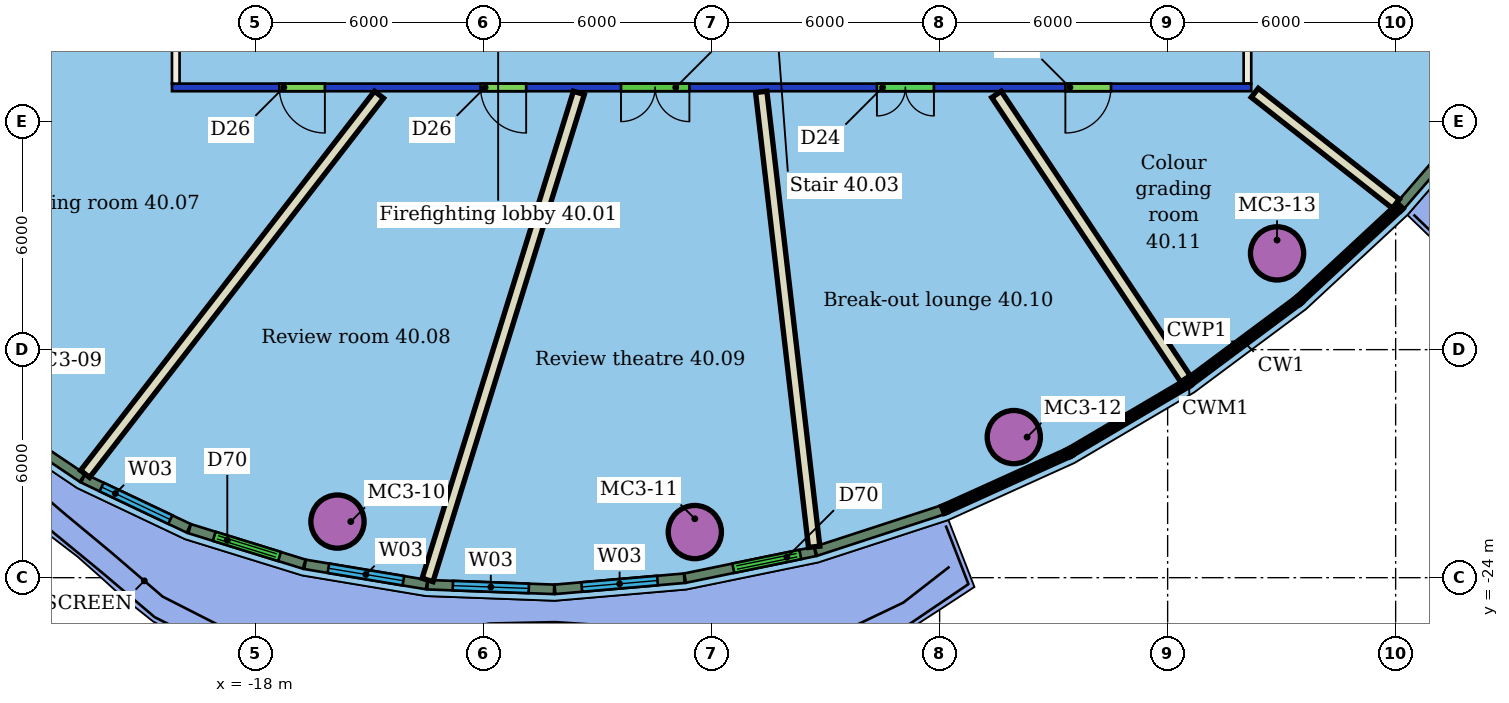
"""IFC4 building model, lengths in metres.
Left out: names, types, materials, properties, quantities, classifications, styles, units other than length and angle.
Written with IfcOpenShell. Run it as: python <this file> out.ifc"""

import sys

from ifc_helpers import new_model, si_unit, direction, frame, frame_2d, origin, origin_2d, place, context, subcontext, project, spatial, rectangle, hollow_circle, extrude, element, fill, save


model = new_model("IFC4")
c1 = context("Model", 3, precision=1e-05, world=origin(), true_north=direction((0.0, 1.0)))
c2 = subcontext(c1, "Body", "Model", "MODEL_VIEW")
j1 = project(units=[si_unit("LENGTHUNIT", "METRE"), si_unit("PLANEANGLEUNIT", "RADIAN")], contexts=[c1])
p1 = place(None, origin())
s1 = spatial("IfcSite", under=j1, at=p1, CompositionType="ELEMENT")
p2 = place(p1, origin())
s2 = spatial("IfcBuilding", under=s1, at=p2, CompositionType="ELEMENT")
p3 = place(p2, frame((0.0, 0.0, 168.6)))
s3 = spatial("IfcBuildingStorey", under=s2, at=p3, CompositionType="ELEMENT", Elevation=168.6)
for number, where, z_axis, x_axis in (
    (1, (-15.845, -22.524, 0.0), (0.0, 0.0, 1.0), (1.0, 0.0, 0.0)),
    (2, (-6.442, -22.8, 0.0), (0.0, 0.0, 1.0), (1.0, 0.0, 0.0)),
    (3, (1.952, -20.301, 0.0), (0.0, 0.0, 1.0), (1.0, 0.0, 0.0)),
    (4, (8.879, -15.467, 0.0), (0.0, 0.0, 1.0), (1.0, 0.0, 0.0)),
):
    element("IfcColumn", number, at=place(p3, frame(where, z_axis=z_axis, x_axis=x_axis)), inside=s3, PredefinedType="COLUMN", context=c2, shape_type="SweptSolid", body=[
        extrude(hollow_circle(Radius=0.7, WallThickness=0.05, at=origin_2d()), origin(), (0.0, 0.0, 1.0), 3.45),
    ])
p4 = place(p3, frame((8.2, -11.1, 0.0), z_axis=(0.0, 0.0, 1.0), x_axis=(-1.0, 0.0, 0.0)))
e5 = element("IfcWall", 5, at=p4, inside=s3, PredefinedType="PARTITIONING", context=c2, shape_type="SweptSolid", body=[
    extrude(rectangle(XDim=28.4, YDim=0.2, at=frame_2d((14.2, 0.0))), origin(), (0.0, 0.0, 1.0), 3.05),
])
p5 = place(p4, frame((24.377, 0.0, 0.0)))
e6 = element("IfcOpeningElement", 6, at=p5, cuts=e5, PredefinedType="OPENING", context=c2, shape_type="SweptSolid", body=[
    extrude(rectangle(XDim=1.2, YDim=2.1, at=frame_2d((0.6, 1.05))), frame((0.0, 0.11, 0.0), z_axis=(0.0, -1.0, 0.0), x_axis=(1.0, 0.0, 0.0)), (0.0, 0.0, 1.0), 0.22),
])
p6 = place(p4, frame((19.08, 0.0, 0.0)))
e7 = element("IfcOpeningElement", 7, at=p6, cuts=e5, PredefinedType="OPENING", context=c2, shape_type="SweptSolid", body=[
    extrude(rectangle(XDim=1.2, YDim=2.1, at=frame_2d((0.6, 1.05))), frame((0.0, 0.11, 0.0), z_axis=(0.0, -1.0, 0.0), x_axis=(1.0, 0.0, 0.0)), (0.0, 0.0, 1.0), 0.22),
])
p7 = place(p4, frame((14.784, 0.0, 0.0)))
e8 = element("IfcOpeningElement", 8, at=p7, cuts=e5, PredefinedType="OPENING", context=c2, shape_type="SweptSolid", body=[
    extrude(rectangle(XDim=1.8, YDim=2.4, at=frame_2d((0.9, 1.2))), frame((0.0, 0.11, 0.0), z_axis=(0.0, -1.0, 0.0), x_axis=(1.0, 0.0, 0.0)), (0.0, 0.0, 1.0), 0.22),
])
p8 = place(p4, frame((8.35, 0.0, 0.0)))
e9 = element("IfcOpeningElement", 9, at=p8, cuts=e5, PredefinedType="OPENING", context=c2, shape_type="SweptSolid", body=[
    extrude(rectangle(XDim=1.5, YDim=2.1, at=frame_2d((0.75, 1.05))), frame((0.0, 0.11, 0.0), z_axis=(0.0, -1.0, 0.0), x_axis=(1.0, 0.0, 0.0)), (0.0, 0.0, 1.0), 0.22),
])
p9 = place(p4, frame((3.691, 0.0, 0.0)))
e10 = element("IfcOpeningElement", 10, at=p9, cuts=e5, PredefinedType="OPENING", context=c2, shape_type="SweptSolid", body=[
    extrude(rectangle(XDim=1.2, YDim=2.1, at=frame_2d((0.6, 1.05))), frame((0.0, 0.11, 0.0), z_axis=(0.0, -1.0, 0.0), x_axis=(1.0, 0.0, 0.0)), (0.0, 0.0, 1.0), 0.22),
])
p10 = place(p3, frame((-20.1, -11.0, 0.0), z_axis=(0.0, 0.0, 1.0), x_axis=(0.0, 1.0, 0.0)))
e11 = element("IfcWall", 11, at=p10, inside=s3, PredefinedType="PARTITIONING", context=c2, shape_type="SweptSolid", body=[
    extrude(rectangle(XDim=22.0, YDim=0.2, at=frame_2d((11.0, 0.0))), origin(), (0.0, 0.0, 1.0), 3.45),
])
p11 = place(p10, frame((16.562, 0.0, 0.0)))
e12 = element("IfcOpeningElement", 12, at=p11, cuts=e11, PredefinedType="OPENING", context=c2, shape_type="SweptSolid", body=[
    extrude(rectangle(XDim=1.0, YDim=2.1, at=frame_2d((0.5, 1.05))), frame((0.0, 0.11, 0.0), z_axis=(0.0, -1.0, 0.0), x_axis=(1.0, 0.0, 0.0)), (0.0, 0.0, 1.0), 0.22),
])
p12 = place(p10, frame((11.71, 0.0, 0.0)))
e13 = element("IfcOpeningElement", 13, at=p12, cuts=e11, PredefinedType="OPENING", context=c2, shape_type="SweptSolid", body=[
    extrude(rectangle(XDim=1.1, YDim=2.1, at=frame_2d((0.55, 1.05))), frame((0.0, 0.11, 0.0), z_axis=(0.0, -1.0, 0.0), x_axis=(1.0, 0.0, 0.0)), (0.0, 0.0, 1.0), 0.22),
])
p13 = place(p10, frame((6.269, 0.0, 0.0)))
e14 = element("IfcOpeningElement", 14, at=p13, cuts=e11, PredefinedType="OPENING", context=c2, shape_type="SweptSolid", body=[
    extrude(rectangle(XDim=1.2, YDim=2.1, at=frame_2d((0.6, 1.05))), frame((0.0, 0.11, 0.0), z_axis=(0.0, -1.0, 0.0), x_axis=(1.0, 0.0, 0.0)), (0.0, 0.0, 1.0), 0.22),
])
p14 = place(p3, frame((8.1, 11.0, 0.0), z_axis=(0.0, 0.0, 1.0), x_axis=(0.0, -1.0, 0.0)))
e15 = element("IfcWall", 15, at=p14, inside=s3, PredefinedType="PARTITIONING", context=c2, shape_type="SweptSolid", body=[
    extrude(rectangle(XDim=22.0, YDim=0.2, at=frame_2d((11.0, 0.0))), origin(), (0.0, 0.0, 1.0), 3.45),
])
p15 = place(p14, frame((12.716, 0.0, 0.0)))
e16 = element("IfcOpeningElement", 16, at=p15, cuts=e15, PredefinedType="OPENING", context=c2, shape_type="SweptSolid", body=[
    extrude(rectangle(XDim=1.2, YDim=2.1, at=frame_2d((0.6, 1.05))), frame((0.0, 0.11, 0.0), z_axis=(0.0, -1.0, 0.0), x_axis=(1.0, 0.0, 0.0)), (0.0, 0.0, 1.0), 0.22),
])
p16 = place(p14, frame((5.725, 0.0, 0.0)))
e17 = element("IfcOpeningElement", 17, at=p16, cuts=e15, PredefinedType="OPENING", context=c2, shape_type="SweptSolid", body=[
    extrude(rectangle(XDim=1.1, YDim=2.1, at=frame_2d((0.55, 1.05))), frame((0.0, 0.11, 0.0), z_axis=(0.0, -1.0, 0.0), x_axis=(1.0, 0.0, 0.0)), (0.0, 0.0, 1.0), 0.22),
])
p17 = place(p3, frame((-30.406, -12.699, 0.0), z_axis=(0.0, 0.0, 1.0), x_axis=(0.887102031539, 0.461573380557, 0.0)))
e18 = element("IfcWall", 18, at=p17, inside=s3, PredefinedType="PARTITIONING", context=c2, shape_type="SweptSolid", body=[
    extrude(rectangle(XDim=11.427, YDim=0.3, at=frame_2d((5.713, 0.0))), origin(), (0.0, 0.0, 1.0), 3.45),
])
p18 = place(p3, frame((-22.486, -21.271, 0.0), z_axis=(0.0, 0.0, 1.0), x_axis=(0.612600962366, 0.790392346185, 0.0)))
e19 = element("IfcWall", 19, at=p18, inside=s3, PredefinedType="PARTITIONING", context=c2, shape_type="SweptSolid", body=[
    extrude(rectangle(XDim=12.625, YDim=0.3, at=frame_2d((6.312, 0.0))), origin(), (0.0, 0.0, 1.0), 3.45),
])
p19 = place(p3, frame((-13.474, -24.06, 0.0), z_axis=(0.0, 0.0, 1.0), x_axis=(0.296649264785, 0.954986499225, 0.0)))
e20 = element("IfcWall", 20, at=p19, inside=s3, PredefinedType="PARTITIONING", context=c2, shape_type="SweptSolid", body=[
    extrude(rectangle(XDim=13.42, YDim=0.3, at=frame_2d((6.71, 0.0))), origin(), (0.0, 0.0, 1.0), 3.45),
])
p20 = place(p3, frame((-3.302, -23.188, 0.0), z_axis=(0.0, 0.0, 1.0), x_axis=(-0.11559754707, 0.993296132637, 0.0)))
e21 = element("IfcWall", 21, at=p20, inside=s3, PredefinedType="PARTITIONING", context=c2, shape_type="SweptSolid", body=[
    extrude(rectangle(XDim=12.051, YDim=0.3, at=frame_2d((6.025, 0.0))), origin(), (0.0, 0.0, 1.0), 3.45),
])
p21 = place(p3, frame((6.469, -18.767, 0.0), z_axis=(0.0, 0.0, 1.0), x_axis=(-0.553401560542, 0.832914589132, 0.0)))
e22 = element("IfcWall", 22, at=p21, inside=s3, PredefinedType="PARTITIONING", context=c2, shape_type="SweptSolid", body=[
    extrude(rectangle(XDim=8.985, YDim=0.3, at=frame_2d((4.493, 0.0))), origin(), (0.0, 0.0, 1.0), 3.45),
])
p22 = place(p3, frame((12.005, -14.162, 0.0), z_axis=(0.0, 0.0, 1.0), x_axis=(-0.785991742752, 0.618236993657, 0.0)))
e23 = element("IfcWall", 23, at=p22, inside=s3, PredefinedType="PARTITIONING", context=c2, shape_type="SweptSolid", body=[
    extrude(rectangle(XDim=4.723, YDim=0.3, at=frame_2d((2.361, 0.0))), origin(), (0.0, 0.0, 1.0), 3.45),
])
p23 = place(p3, frame((-25.019, -19.719, 0.0), z_axis=(0.0, 0.0, 1.0), x_axis=(0.830042449649, -0.557700216765, 0.0)))
e24 = element("IfcWall", 24, at=p23, inside=s3, PredefinedType="SOLIDWALL", context=c2, shape_type="SweptSolid", body=[
    extrude(rectangle(XDim=2.964, YDim=0.25, at=frame_2d((1.482, 0.0))), origin(), (0.0, 0.0, 1.0), 3.1),
])
p24 = place(p3, frame((-22.536, -21.385, 0.0), z_axis=(0.0, 0.0, 1.0), x_axis=(0.903619724227, -0.428335609058, 0.0)))
e25 = element("IfcWall", 25, at=p24, inside=s3, PredefinedType="SOLIDWALL", context=c2, shape_type="SweptSolid", body=[
    extrude(rectangle(XDim=3.073, YDim=0.25, at=frame_2d((1.537, 0.0))), origin(), (0.0, 0.0, 1.0), 3.1),
])
p25 = place(p24, frame((0.537, 0.0, 0.9)))
e26 = element("IfcOpeningElement", 26, at=p25, cuts=e25, PredefinedType="OPENING", context=c2, shape_type="SweptSolid", body=[
    extrude(rectangle(XDim=2.0, YDim=2.1, at=frame_2d((1.0, 1.05))), frame((0.0, 0.135, 0.0), z_axis=(0.0, -1.0, 0.0), x_axis=(1.0, 0.0, 0.0)), (0.0, 0.0, 1.0), 0.27),
])
p26 = place(p3, frame((-19.735, -22.711, 0.0), z_axis=(0.0, 0.0, 1.0), x_axis=(0.955252052872, -0.295793028119, 0.0)))
e27 = element("IfcWall", 27, at=p26, inside=s3, PredefinedType="SOLIDWALL", context=c2, shape_type="SweptSolid", body=[
    extrude(rectangle(XDim=3.155, YDim=0.25, at=frame_2d((1.577, 0.0))), origin(), (0.0, 0.0, 1.0), 3.1),
])
p27 = place(p26, frame((0.677, 0.0, 0.0)))
e28 = element("IfcOpeningElement", 28, at=p27, cuts=e27, PredefinedType="OPENING", context=c2, shape_type="SweptSolid", body=[
    extrude(rectangle(XDim=1.8, YDim=2.4, at=frame_2d((0.9, 1.2))), frame((0.0, 0.135, 0.0), z_axis=(0.0, -1.0, 0.0), x_axis=(1.0, 0.0, 0.0)), (0.0, 0.0, 1.0), 0.27),
])
p28 = place(p3, frame((-16.697, -23.65, 0.0), z_axis=(0.0, 0.0, 1.0), x_axis=(0.986414264197, -0.164276898525, 0.0)))
e29 = element("IfcWall", 29, at=p28, inside=s3, PredefinedType="SOLIDWALL", context=c2, shape_type="SweptSolid", body=[
    extrude(rectangle(XDim=3.243, YDim=0.25, at=frame_2d((1.621, 0.0))), origin(), (0.0, 0.0, 1.0), 3.1),
])
p29 = place(p28, frame((0.621, 0.0, 0.9)))
e30 = element("IfcOpeningElement", 30, at=p29, cuts=e29, PredefinedType="OPENING", context=c2, shape_type="SweptSolid", body=[
    extrude(rectangle(XDim=2.0, YDim=2.1, at=frame_2d((1.0, 1.05))), frame((0.0, 0.135, 0.0), z_axis=(0.0, -1.0, 0.0), x_axis=(1.0, 0.0, 0.0)), (0.0, 0.0, 1.0), 0.27),
])
p30 = place(p3, frame((-13.475, -24.185, 0.0), z_axis=(0.0, 0.0, 1.0), x_axis=(0.999325831556, -0.036713517754, 0.0)))
e31 = element("IfcWall", 31, at=p30, inside=s3, PredefinedType="SOLIDWALL", context=c2, shape_type="SweptSolid", body=[
    extrude(rectangle(XDim=3.332, YDim=0.25, at=frame_2d((1.666, 0.0))), origin(), (0.0, 0.0, 1.0), 3.1),
])
p31 = place(p30, frame((0.666, 0.0, 0.9)))
e32 = element("IfcOpeningElement", 32, at=p31, cuts=e31, PredefinedType="OPENING", context=c2, shape_type="SweptSolid", body=[
    extrude(rectangle(XDim=2.0, YDim=2.1, at=frame_2d((1.0, 1.05))), frame((0.0, 0.135, 0.0), z_axis=(0.0, -1.0, 0.0), x_axis=(1.0, 0.0, 0.0)), (0.0, 0.0, 1.0), 0.27),
])
p32 = place(p3, frame((-10.122, -24.306, 0.0), z_axis=(0.0, 0.0, 1.0), x_axis=(0.996350297924, 0.085358560359, 0.0)))
e33 = element("IfcWall", 33, at=p32, inside=s3, PredefinedType="SOLIDWALL", context=c2, shape_type="SweptSolid", body=[
    extrude(rectangle(XDim=3.415, YDim=0.25, at=frame_2d((1.708, 0.0))), origin(), (0.0, 0.0, 1.0), 3.1),
])
p33 = place(p32, frame((0.708, 0.0, 0.9)))
e34 = element("IfcOpeningElement", 34, at=p33, cuts=e33, PredefinedType="OPENING", context=c2, shape_type="SweptSolid", body=[
    extrude(rectangle(XDim=2.0, YDim=2.1, at=frame_2d((1.0, 1.05))), frame((0.0, 0.135, 0.0), z_axis=(0.0, -1.0, 0.0), x_axis=(1.0, 0.0, 0.0)), (0.0, 0.0, 1.0), 0.27),
])
p34 = place(p3, frame((-6.697, -24.012, 0.0), z_axis=(0.0, 0.0, 1.0), x_axis=(0.979588567623, 0.201013029881, 0.0)))
e35 = element("IfcWall", 35, at=p34, inside=s3, PredefinedType="SOLIDWALL", context=c2, shape_type="SweptSolid", body=[
    extrude(rectangle(XDim=3.488, YDim=0.25, at=frame_2d((1.744, 0.0))), origin(), (0.0, 0.0, 1.0), 3.1),
])
p35 = place(p34, frame((1.294, 0.0, 0.0)))
e36 = element("IfcOpeningElement", 36, at=p35, cuts=e35, PredefinedType="OPENING", context=c2, shape_type="SweptSolid", body=[
    extrude(rectangle(XDim=1.8, YDim=2.4, at=frame_2d((0.9, 1.2))), frame((0.0, 0.135, 0.0), z_axis=(0.0, -1.0, 0.0), x_axis=(1.0, 0.0, 0.0)), (0.0, 0.0, 1.0), 0.27),
])
p36 = place(p3, frame((-3.259, -23.305, 0.0), z_axis=(0.0, 0.0, 1.0), x_axis=(0.950740111952, 0.309989095817, 0.0)))
e37 = element("IfcWall", 37, at=p36, inside=s3, PredefinedType="SOLIDWALL", context=c2, shape_type="SweptSolid", body=[
    extrude(rectangle(XDim=3.502, YDim=0.25, at=frame_2d((1.751, 0.0))), origin(), (0.0, 0.0, 1.0), 3.1),
])
p37 = place(p3, frame((12.131, -14.207, 0.0), z_axis=(0.0, 0.0, 1.0), x_axis=(0.654160555631, 0.756355714897, 0.0)))
e38 = element("IfcWall", 38, at=p37, inside=s3, PredefinedType="SOLIDWALL", context=c2, shape_type="SweptSolid", body=[
    extrude(rectangle(XDim=3.502, YDim=0.25, at=frame_2d((1.751, 0.0))), origin(), (0.0, 0.0, 1.0), 3.1),
])
p38 = place(p5, origin())
e39 = element("IfcDoor", 39, at=p38, inside=s3, OperationType="SINGLE_SWING_LEFT", PredefinedType="DOOR", context=c2, shape_type="SweptSolid", body=[
    extrude(rectangle(XDim=1.2, YDim=2.1, at=frame_2d((0.6, 1.05))), frame((0.0, 0.025, 0.0), z_axis=(0.0, -1.0, 0.0), x_axis=(1.0, 0.0, 0.0)), (0.0, 0.0, 1.0), 0.05),
])
fill(e6, e39)
p39 = place(p6, origin())
e40 = element("IfcDoor", 40, at=p39, inside=s3, OperationType="SINGLE_SWING_LEFT", PredefinedType="DOOR", context=c2, shape_type="SweptSolid", body=[
    extrude(rectangle(XDim=1.2, YDim=2.1, at=frame_2d((0.6, 1.05))), frame((0.0, 0.025, 0.0), z_axis=(0.0, -1.0, 0.0), x_axis=(1.0, 0.0, 0.0)), (0.0, 0.0, 1.0), 0.05),
])
fill(e7, e40)
p40 = place(p7, origin())
e41 = element("IfcDoor", 41, at=p40, inside=s3, OperationType="DOUBLE_DOOR_SINGLE_SWING", PredefinedType="DOOR", context=c2, shape_type="SweptSolid", body=[
    extrude(rectangle(XDim=1.8, YDim=2.4, at=frame_2d((0.9, 1.2))), frame((0.0, 0.025, 0.0), z_axis=(0.0, -1.0, 0.0), x_axis=(1.0, 0.0, 0.0)), (0.0, 0.0, 1.0), 0.05),
])
fill(e8, e41)
p41 = place(p8, origin())
e42 = element("IfcDoor", 42, at=p41, inside=s3, OperationType="DOUBLE_DOOR_SINGLE_SWING", PredefinedType="DOOR", context=c2, shape_type="SweptSolid", body=[
    extrude(rectangle(XDim=1.5, YDim=2.1, at=frame_2d((0.75, 1.05))), frame((0.0, 0.025, 0.0), z_axis=(0.0, -1.0, 0.0), x_axis=(1.0, 0.0, 0.0)), (0.0, 0.0, 1.0), 0.05),
])
fill(e9, e42)
p42 = place(p9, origin())
e43 = element("IfcDoor", 43, at=p42, inside=s3, OperationType="SINGLE_SWING_RIGHT", PredefinedType="DOOR", context=c2, shape_type="SweptSolid", body=[
    extrude(rectangle(XDim=1.2, YDim=2.1, at=frame_2d((0.6, 1.05))), frame((0.0, 0.025, 0.0), z_axis=(0.0, -1.0, 0.0), x_axis=(1.0, 0.0, 0.0)), (0.0, 0.0, 1.0), 0.05),
])
fill(e10, e43)
p43 = place(p25, origin())
e44 = element("IfcWindow", 44, at=p43, inside=s3, PartitioningType="SINGLE_PANEL", PredefinedType="WINDOW", context=c2, shape_type="SweptSolid", body=[
    extrude(rectangle(XDim=2.0, YDim=2.1, at=frame_2d((1.0, 1.05))), frame((0.0, 0.03, 0.0), z_axis=(0.0, -1.0, 0.0), x_axis=(1.0, 0.0, 0.0)), (0.0, 0.0, 1.0), 0.06),
])
fill(e26, e44)
p44 = place(p27, origin())
e45 = element("IfcDoor", 45, at=p44, inside=s3, OperationType="DOUBLE_DOOR_SLIDING", PredefinedType="DOOR", context=c2, shape_type="SweptSolid", body=[
    extrude(rectangle(XDim=1.8, YDim=2.4, at=frame_2d((0.9, 1.2))), frame((0.0, 0.025, 0.0), z_axis=(0.0, -1.0, 0.0), x_axis=(1.0, 0.0, 0.0)), (0.0, 0.0, 1.0), 0.05),
])
fill(e28, e45)
p45 = place(p29, origin())
e46 = element("IfcWindow", 46, at=p45, inside=s3, PartitioningType="SINGLE_PANEL", PredefinedType="WINDOW", context=c2, shape_type="SweptSolid", body=[
    extrude(rectangle(XDim=2.0, YDim=2.1, at=frame_2d((1.0, 1.05))), frame((0.0, 0.03, 0.0), z_axis=(0.0, -1.0, 0.0), x_axis=(1.0, 0.0, 0.0)), (0.0, 0.0, 1.0), 0.06),
])
fill(e30, e46)
p46 = place(p31, origin())
e47 = element("IfcWindow", 47, at=p46, inside=s3, PartitioningType="SINGLE_PANEL", PredefinedType="WINDOW", context=c2, shape_type="SweptSolid", body=[
    extrude(rectangle(XDim=2.0, YDim=2.1, at=frame_2d((1.0, 1.05))), frame((0.0, 0.03, 0.0), z_axis=(0.0, -1.0, 0.0), x_axis=(1.0, 0.0, 0.0)), (0.0, 0.0, 1.0), 0.06),
])
fill(e32, e47)
p47 = place(p33, origin())
e48 = element("IfcWindow", 48, at=p47, inside=s3, PartitioningType="SINGLE_PANEL", PredefinedType="WINDOW", context=c2, shape_type="SweptSolid", body=[
    extrude(rectangle(XDim=2.0, YDim=2.1, at=frame_2d((1.0, 1.05))), frame((0.0, 0.03, 0.0), z_axis=(0.0, -1.0, 0.0), x_axis=(1.0, 0.0, 0.0)), (0.0, 0.0, 1.0), 0.06),
])
fill(e34, e48)
p48 = place(p35, origin())
e49 = element("IfcDoor", 49, at=p48, inside=s3, OperationType="DOUBLE_DOOR_SLIDING", PredefinedType="DOOR", context=c2, shape_type="SweptSolid", body=[
    extrude(rectangle(XDim=1.8, YDim=2.4, at=frame_2d((0.9, 1.2))), frame((0.0, 0.025, 0.0), z_axis=(0.0, -1.0, 0.0), x_axis=(1.0, 0.0, 0.0)), (0.0, 0.0, 1.0), 0.05),
])
fill(e36, e49)
save(model, sys.argv[1])
